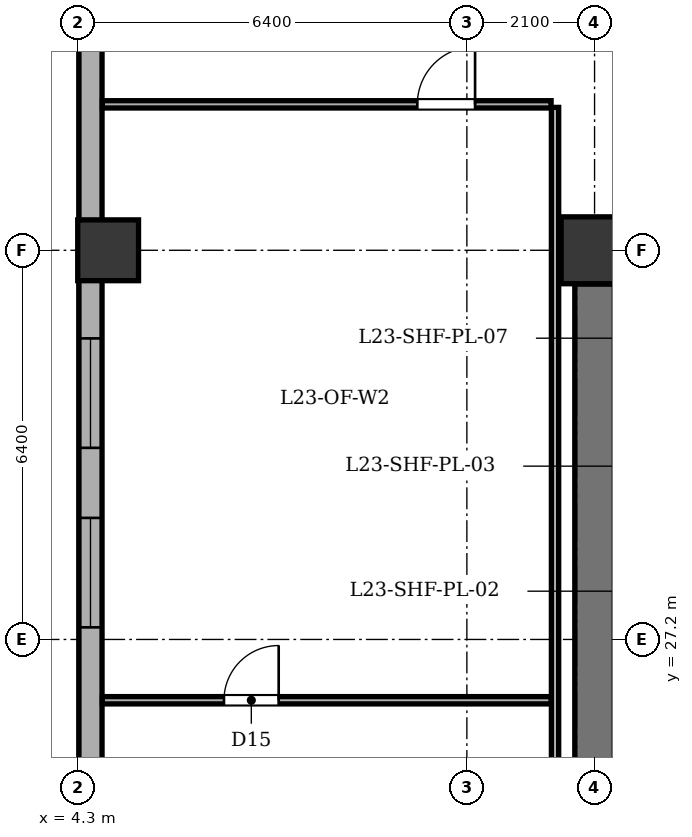
"""IFC4 building model, lengths in metres.
Left out: names, types, materials, properties, quantities, classifications, styles, units other than length and angle.
Written with IfcOpenShell. Run it as: python <this file> out.ifc"""

import sys

from ifc_helpers import new_model, si_unit, direction, frame, frame_2d, origin, origin_2d, place, context, subcontext, project, spatial, rectangle, extrude, element, fill, save


model = new_model("IFC4")
c1 = context("Model", 3, precision=1e-05, world=origin(), true_north=direction((0.0, 1.0)))
c2 = subcontext(c1, "Body", "Model", "MODEL_VIEW")
j1 = project(units=[si_unit("LENGTHUNIT", "METRE"), si_unit("PLANEANGLEUNIT", "RADIAN")], contexts=[c1])
p1 = place(None, origin())
s1 = spatial("IfcSite", under=j1, at=p1, CompositionType="ELEMENT")
p2 = place(p1, origin())
s2 = spatial("IfcBuilding", under=s1, at=p2, CompositionType="ELEMENT")
p3 = place(p2, frame((0.0, 0.0, 94.5)))
s3 = spatial("IfcBuildingStorey", under=s2, at=p3, CompositionType="ELEMENT", Elevation=94.5)
p4 = place(p3, frame((12.8, 33.6, 0.0), z_axis=(0.0, 0.0, 1.0), x_axis=(1.0, 0.0, 0.0)))
e1 = element("IfcColumn", 1, at=p4, inside=s3, PredefinedType="COLUMN", context=c2, shape_type="SweptSolid", body=[
    extrude(rectangle(XDim=1.1, YDim=1.1, at=origin_2d()), origin(), (0.0, 0.0, 1.0), 3.9),
])
p5 = place(p3, frame((4.8, 33.6, 0.0), z_axis=(0.0, 0.0, 1.0), x_axis=(1.0, 0.0, 0.0)))
e2 = element("IfcColumn", 2, at=p5, inside=s3, PredefinedType="COLUMN", context=c2, shape_type="SweptSolid", body=[
    extrude(rectangle(XDim=1.0, YDim=1.0, at=origin_2d()), origin(), (0.0, 0.0, 1.0), 3.9),
])
p6 = place(p3, frame((4.51, 12.9, 0.0), z_axis=(0.0, 0.0, 1.0), x_axis=(0.0, 1.0, 0.0)))
e3 = element("IfcWall", 3, at=p6, inside=s3, PredefinedType="STANDARD", context=c2, shape_type="SweptSolid", body=[
    extrude(rectangle(XDim=35.0, YDim=0.38, at=frame_2d((17.5, 0.0))), origin(), (0.0, 0.0, 1.0), 3.135),
])
p7 = place(p6, frame((2.025, 0.0, 0.8)))
e4 = element("IfcOpeningElement", 4, at=p7, cuts=e3, PredefinedType="OPENING", context=c2, shape_type="SweptSolid", body=[
    extrude(rectangle(XDim=1.8, YDim=1.9, at=frame_2d((0.9, 0.95))), frame((0.0, 0.2, 0.0), z_axis=(0.0, -1.0, 0.0), x_axis=(1.0, 0.0, 0.0)), (0.0, 0.0, 1.0), 0.4),
])
p8 = place(p6, frame((9.825, 0.0, 0.8)))
e5 = element("IfcOpeningElement", 5, at=p8, cuts=e3, PredefinedType="OPENING", context=c2, shape_type="SweptSolid", body=[
    extrude(rectangle(XDim=1.8, YDim=1.9, at=frame_2d((0.9, 0.95))), frame((0.0, 0.2, 0.0), z_axis=(0.0, -1.0, 0.0), x_axis=(1.0, 0.0, 0.0)), (0.0, 0.0, 1.0), 0.4),
])
p9 = place(p6, frame((14.499, 0.0, 0.8)))
e6 = element("IfcOpeningElement", 6, at=p9, cuts=e3, PredefinedType="OPENING", context=c2, shape_type="SweptSolid", body=[
    extrude(rectangle(XDim=1.8, YDim=1.9, at=frame_2d((0.9, 0.95))), frame((0.0, 0.2, 0.0), z_axis=(0.0, -1.0, 0.0), x_axis=(1.0, 0.0, 0.0)), (0.0, 0.0, 1.0), 0.4),
])
p10 = place(p6, frame((17.451, 0.0, 0.8)))
e7 = element("IfcOpeningElement", 7, at=p10, cuts=e3, PredefinedType="OPENING", context=c2, shape_type="SweptSolid", body=[
    extrude(rectangle(XDim=1.8, YDim=1.9, at=frame_2d((0.9, 0.95))), frame((0.0, 0.2, 0.0), z_axis=(0.0, -1.0, 0.0), x_axis=(1.0, 0.0, 0.0)), (0.0, 0.0, 1.0), 0.4),
])
p11 = place(p6, frame((25.443, 0.0, 0.8)))
e8 = element("IfcOpeningElement", 8, at=p11, cuts=e3, PredefinedType="OPENING", context=c2, shape_type="SweptSolid", body=[
    extrude(rectangle(XDim=1.8, YDim=1.9, at=frame_2d((0.9, 0.95))), frame((0.0, 0.2, 0.0), z_axis=(0.0, -1.0, 0.0), x_axis=(1.0, 0.0, 0.0)), (0.0, 0.0, 1.0), 0.4),
])
p12 = place(p6, frame((30.207, 0.0, 0.8)))
e9 = element("IfcOpeningElement", 9, at=p12, cuts=e3, PredefinedType="OPENING", context=c2, shape_type="SweptSolid", body=[
    extrude(rectangle(XDim=2.4, YDim=1.9, at=frame_2d((1.2, 0.95))), frame((0.0, 0.2, 0.0), z_axis=(0.0, -1.0, 0.0), x_axis=(1.0, 0.0, 0.0)), (0.0, 0.0, 1.0), 0.4),
])
p13 = place(p3, frame((12.8, 21.355, 0.0), z_axis=(0.0, 0.0, 1.0), x_axis=(0.0, 1.0, 0.0)))
e10 = element("IfcWall", 10, at=p13, inside=s3, PredefinedType="SHEAR", context=c2, shape_type="SweptSolid", body=[
    extrude(rectangle(XDim=11.69, YDim=0.65, at=frame_2d((5.845, 0.0))), origin(), (0.0, 0.0, 1.0), 3.6),
])
p14 = place(p3, frame((12.15, 18.45, 0.0), z_axis=(0.0, 0.0, 1.0), x_axis=(0.0, 1.0, 0.0)))
e11 = element("IfcWall", 11, at=p14, inside=s3, PredefinedType="PARTITIONING", context=c2, shape_type="SweptSolid", body=[
    extrude(rectangle(XDim=17.5, YDim=0.12, at=frame_2d((8.75, 0.0))), origin(), (0.0, 0.0, 1.0), 3.6),
])
p15 = place(p3, frame((4.705, 36.0, 0.0), z_axis=(0.0, 0.0, 1.0), x_axis=(1.0, 0.0, 0.0)))
e12 = element("IfcWall", 12, at=p15, inside=s3, PredefinedType="PARTITIONING", context=c2, shape_type="SweptSolid", body=[
    extrude(rectangle(XDim=7.38, YDim=0.12, at=frame_2d((3.69, 0.0))), origin(), (0.0, 0.0, 1.0), 3.6),
])
p16 = place(p15, frame((5.18, 0.0, 0.0)))
e13 = element("IfcOpeningElement", 13, at=p16, cuts=e12, PredefinedType="OPENING", context=c2, shape_type="SweptSolid", body=[
    extrude(rectangle(XDim=0.95, YDim=2.1, at=frame_2d((0.475, 1.05))), frame((0.0, 0.07, 0.0), z_axis=(0.0, -1.0, 0.0), x_axis=(1.0, 0.0, 0.0)), (0.0, 0.0, 1.0), 0.14),
])
p17 = place(p3, frame((4.705, 26.2, 0.0), z_axis=(0.0, 0.0, 1.0), x_axis=(1.0, 0.0, 0.0)))
e14 = element("IfcWall", 14, at=p17, inside=s3, PredefinedType="PARTITIONING", context=c2, shape_type="SweptSolid", body=[
    extrude(rectangle(XDim=7.38, YDim=0.12, at=frame_2d((3.69, 0.0))), origin(), (0.0, 0.0, 1.0), 3.6),
])
p18 = place(p17, frame((2.0, 0.0, 0.0)))
e15 = element("IfcOpeningElement", 15, at=p18, cuts=e14, PredefinedType="OPENING", context=c2, shape_type="SweptSolid", body=[
    extrude(rectangle(XDim=0.9, YDim=2.05, at=frame_2d((0.45, 1.025))), frame((0.0, 0.07, 0.0), z_axis=(0.0, -1.0, 0.0), x_axis=(1.0, 0.0, 0.0)), (0.0, 0.0, 1.0), 0.14),
])
p19 = place(p9, origin())
e16 = element("IfcWindow", 16, at=p19, inside=s3, PartitioningType="SINGLE_PANEL", PredefinedType="WINDOW", context=c2, shape_type="SweptSolid", body=[
    extrude(rectangle(XDim=1.8, YDim=1.9, at=frame_2d((0.9, 0.95))), frame((0.0, -0.01, 0.0), z_axis=(0.0, -1.0, 0.0), x_axis=(1.0, 0.0, 0.0)), (0.0, 0.0, 1.0), 0.06),
])
fill(e6, e16)
p20 = place(p10, origin())
e17 = element("IfcWindow", 17, at=p20, inside=s3, PartitioningType="SINGLE_PANEL", PredefinedType="WINDOW", context=c2, shape_type="SweptSolid", body=[
    extrude(rectangle(XDim=1.8, YDim=1.9, at=frame_2d((0.9, 0.95))), frame((0.0, -0.01, 0.0), z_axis=(0.0, -1.0, 0.0), x_axis=(1.0, 0.0, 0.0)), (0.0, 0.0, 1.0), 0.06),
])
fill(e7, e17)
p21 = place(p18, origin())
e18 = element("IfcDoor", 18, at=p21, inside=s3, OperationType="SINGLE_SWING_RIGHT", PredefinedType="DOOR", context=c2, shape_type="SweptSolid", body=[
    extrude(rectangle(XDim=0.9, YDim=2.05, at=frame_2d((0.45, 1.025))), frame((0.0, 0.025, 0.0), z_axis=(0.0, -1.0, 0.0), x_axis=(1.0, 0.0, 0.0)), (0.0, 0.0, 1.0), 0.05),
])
fill(e15, e18)
p22 = place(p16, origin())
e19 = element("IfcDoor", 19, at=p22, inside=s3, OperationType="SINGLE_SWING_RIGHT", PredefinedType="DOOR", context=c2, shape_type="SweptSolid", body=[
    extrude(rectangle(XDim=0.95, YDim=2.1, at=frame_2d((0.475, 1.05))), frame((0.0, 0.025, 0.0), z_axis=(0.0, -1.0, 0.0), x_axis=(1.0, 0.0, 0.0)), (0.0, 0.0, 1.0), 0.05),
])
fill(e13, e19)
save(model, sys.argv[1])
